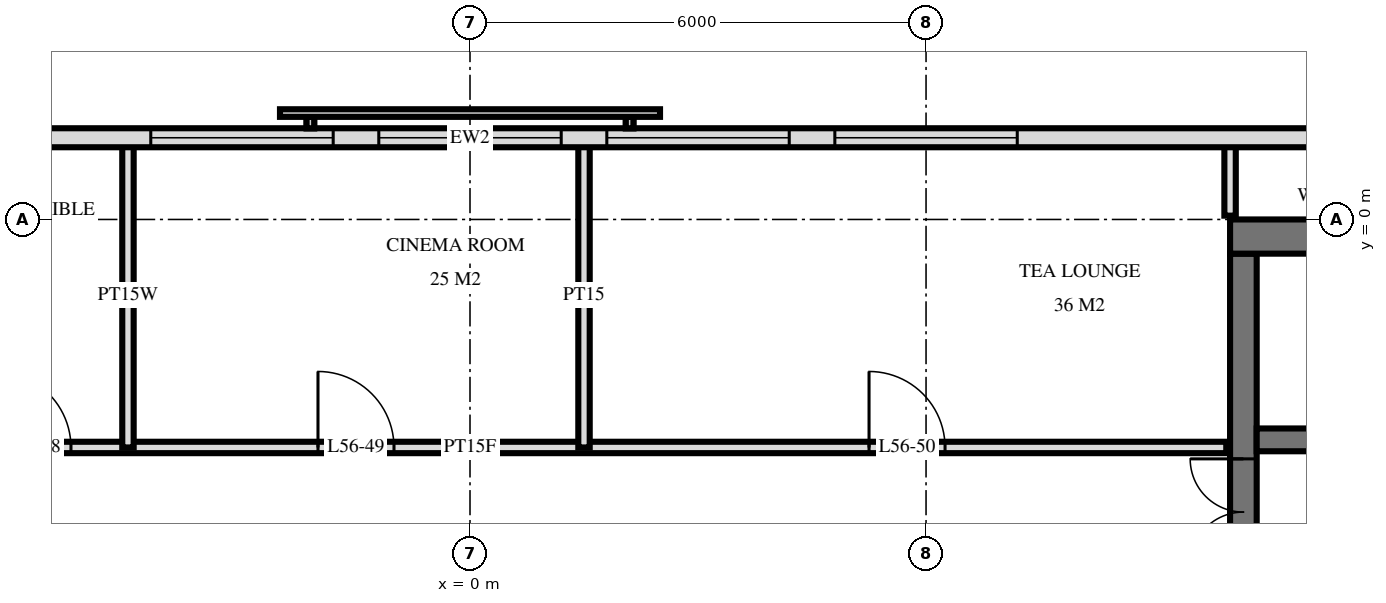
"""IFC4 building model, lengths in metres.
Left out: names, types, materials, properties, quantities, classifications, styles, units other than length and angle.
Written with IfcOpenShell. Run it as: python <this file> out.ifc"""

import sys

from ifc_helpers import new_model, si_unit, direction, frame, frame_2d, origin, place, context, subcontext, project, spatial, rectangle, extrude, element, fill, save


model = new_model("IFC4")
c1 = context("Model", 3, precision=1e-05, world=origin(), true_north=direction((0.0, 1.0)))
c2 = subcontext(c1, "Body", "Model", "MODEL_VIEW")
j1 = project(units=[si_unit("LENGTHUNIT", "METRE"), si_unit("PLANEANGLEUNIT", "RADIAN")], contexts=[c1])
p1 = place(None, origin())
s1 = spatial("IfcSite", under=j1, at=p1, CompositionType="ELEMENT")
p2 = place(p1, origin())
s2 = spatial("IfcBuilding", under=s1, at=p2, CompositionType="ELEMENT")
p3 = place(p2, frame((0.0, 0.0, 215.1)))
s3 = spatial("IfcBuildingStorey", under=s2, at=p3, CompositionType="ELEMENT", Elevation=215.1)
p4 = place(p3, frame((10.0, -0.225, 0.0), z_axis=(0.0, 0.0, 1.0), x_axis=(1.0, 0.0, 0.0)))
e1 = element("IfcWall", 1, at=p4, inside=s3, PredefinedType="SHEAR", context=c2, shape_type="SweptSolid", body=[
    extrude(rectangle(XDim=14.5, YDim=0.45, at=frame_2d((7.25, 0.0))), origin(), (0.0, 0.0, 1.0), 3.5),
])
p5 = place(p3, frame((10.175, -14.55, 0.0), z_axis=(0.0, 0.0, 1.0), x_axis=(0.0, 1.0, 0.0)))
e2 = element("IfcWall", 2, at=p5, inside=s3, PredefinedType="SHEAR", context=c2, shape_type="SweptSolid", body=[
    extrude(rectangle(XDim=14.1, YDim=0.35, at=frame_2d((7.05, 0.0))), origin(), (0.0, 0.0, 1.0), 3.5),
])
p6 = place(p5, frame((8.4, 0.0, 0.0)))
e3 = element("IfcOpeningElement", 3, at=p6, cuts=e2, PredefinedType="OPENING", context=c2, shape_type="SweptSolid", body=[
    extrude(rectangle(XDim=1.4, YDim=2.4, at=frame_2d((0.7, 1.2))), frame((0.0, 0.185, 0.0), z_axis=(0.0, -1.0, 0.0), x_axis=(1.0, 0.0, 0.0)), (0.0, 0.0, 1.0), 0.37),
])
p7 = place(p5, frame((10.0, 0.0, 0.0)))
e4 = element("IfcOpeningElement", 4, at=p7, cuts=e2, PredefinedType="OPENING", context=c2, shape_type="SweptSolid", body=[
    extrude(rectangle(XDim=1.4, YDim=2.4, at=frame_2d((0.7, 1.2))), frame((0.0, 0.185, 0.0), z_axis=(0.0, -1.0, 0.0), x_axis=(1.0, 0.0, 0.0)), (0.0, 0.0, 1.0), 0.37),
])
p8 = place(p5, frame((4.0, 0.0, 0.0)))
e5 = element("IfcOpeningElement", 5, at=p8, cuts=e2, PredefinedType="OPENING", context=c2, shape_type="SweptSolid", body=[
    extrude(rectangle(XDim=1.2, YDim=2.1, at=frame_2d((0.6, 1.05))), frame((0.0, 0.185, 0.0), z_axis=(0.0, -1.0, 0.0), x_axis=(1.0, 0.0, 0.0)), (0.0, 0.0, 1.0), 0.37),
])
p9 = place(p3, frame((10.35, -2.9, 0.0), z_axis=(0.0, 0.0, 1.0), x_axis=(1.0, 0.0, 0.0)))
e6 = element("IfcWall", 6, at=p9, inside=s3, PredefinedType="SHEAR", context=c2, shape_type="SweptSolid", body=[
    extrude(rectangle(XDim=13.7, YDim=0.3, at=frame_2d((6.85, 0.0))), origin(), (0.0, 0.0, 1.0), 3.5),
])
p10 = place(p9, frame((12.05, 0.0, 0.0)))
e7 = element("IfcOpeningElement", 7, at=p10, cuts=e6, PredefinedType="OPENING", context=c2, shape_type="SweptSolid", body=[
    extrude(rectangle(XDim=1.1, YDim=2.1, at=frame_2d((0.55, 1.05))), frame((0.0, 0.16, 0.0), z_axis=(0.0, -1.0, 0.0), x_axis=(1.0, 0.0, 0.0)), (0.0, 0.0, 1.0), 0.32),
])
p11 = place(p9, frame((5.938, 0.0, 0.0)))
e8 = element("IfcOpeningElement", 8, at=p11, cuts=e6, PredefinedType="OPENING", context=c2, shape_type="SweptSolid", body=[
    extrude(rectangle(XDim=0.9, YDim=2.1, at=frame_2d((0.45, 1.05))), frame((0.0, 0.16, 0.0), z_axis=(0.0, -1.0, 0.0), x_axis=(1.0, 0.0, 0.0)), (0.0, 0.0, 1.0), 0.32),
])
p12 = place(p9, frame((7.363, 0.0, 0.0)))
e9 = element("IfcOpeningElement", 9, at=p12, cuts=e6, PredefinedType="OPENING", context=c2, shape_type="SweptSolid", body=[
    extrude(rectangle(XDim=0.9, YDim=2.1, at=frame_2d((0.45, 1.05))), frame((0.0, 0.16, 0.0), z_axis=(0.0, -1.0, 0.0), x_axis=(1.0, 0.0, 0.0)), (0.0, 0.0, 1.0), 0.32),
])
p13 = place(p9, frame((0.85, 0.0, 0.0)))
e10 = element("IfcOpeningElement", 10, at=p13, cuts=e6, PredefinedType="OPENING", context=c2, shape_type="SweptSolid", body=[
    extrude(rectangle(XDim=1.0, YDim=2.1, at=frame_2d((0.5, 1.05))), frame((0.0, 0.16, 0.0), z_axis=(0.0, -1.0, 0.0), x_axis=(1.0, 0.0, 0.0)), (0.0, 0.0, 1.0), 0.32),
])
p14 = place(p9, frame((3.137, 0.0, 0.0)))
e11 = element("IfcOpeningElement", 11, at=p14, cuts=e6, PredefinedType="OPENING", context=c2, shape_type="SweptSolid", body=[
    extrude(rectangle(XDim=1.0, YDim=2.1, at=frame_2d((0.5, 1.05))), frame((0.0, 0.16, 0.0), z_axis=(0.0, -1.0, 0.0), x_axis=(1.0, 0.0, 0.0)), (0.0, 0.0, 1.0), 0.32),
])
p15 = place(p9, frame((4.562, 0.0, 0.0)))
e12 = element("IfcOpeningElement", 12, at=p15, cuts=e6, PredefinedType="OPENING", context=c2, shape_type="SweptSolid", body=[
    extrude(rectangle(XDim=1.0, YDim=2.1, at=frame_2d((0.5, 1.05))), frame((0.0, 0.16, 0.0), z_axis=(0.0, -1.0, 0.0), x_axis=(1.0, 0.0, 0.0)), (0.0, 0.0, 1.0), 0.32),
])
p16 = place(p9, frame((9.7, 0.0, 0.0)))
e13 = element("IfcOpeningElement", 13, at=p16, cuts=e6, PredefinedType="OPENING", context=c2, shape_type="SweptSolid", body=[
    extrude(rectangle(XDim=1.0, YDim=2.1, at=frame_2d((0.5, 1.05))), frame((0.0, 0.16, 0.0), z_axis=(0.0, -1.0, 0.0), x_axis=(1.0, 0.0, 0.0)), (0.0, 0.0, 1.0), 0.32),
])
p17 = place(p3, frame((22.475, 1.075, 0.0), z_axis=(0.0, 0.0, 1.0), x_axis=(-1.0, 0.0, 0.0)))
e14 = element("IfcWall", 14, at=p17, inside=s3, PredefinedType="SOLIDWALL", context=c2, shape_type="SweptSolid", body=[
    extrude(rectangle(XDim=44.951, YDim=0.25, at=frame_2d((22.475, 0.0))), origin(), (0.0, 0.0, 1.0), 3.22),
])
p18 = place(p17, frame((15.275, 0.0, 0.9)))
e15 = element("IfcOpeningElement", 15, at=p18, cuts=e14, PredefinedType="OPENING", context=c2, shape_type="SweptSolid", body=[
    extrude(rectangle(XDim=2.4, YDim=1.5, at=frame_2d((1.2, 0.75))), frame((0.0, 0.135, 0.0), z_axis=(0.0, -1.0, 0.0), x_axis=(1.0, 0.0, 0.0)), (0.0, 0.0, 1.0), 0.27),
])
p19 = place(p17, frame((18.275, 0.0, 0.9)))
e16 = element("IfcOpeningElement", 16, at=p19, cuts=e14, PredefinedType="OPENING", context=c2, shape_type="SweptSolid", body=[
    extrude(rectangle(XDim=2.4, YDim=1.5, at=frame_2d((1.2, 0.75))), frame((0.0, 0.135, 0.0), z_axis=(0.0, -1.0, 0.0), x_axis=(1.0, 0.0, 0.0)), (0.0, 0.0, 1.0), 0.27),
])
p20 = place(p17, frame((21.275, 0.0, 0.9)))
e17 = element("IfcOpeningElement", 17, at=p20, cuts=e14, PredefinedType="OPENING", context=c2, shape_type="SweptSolid", body=[
    extrude(rectangle(XDim=2.4, YDim=1.5, at=frame_2d((1.2, 0.75))), frame((0.0, 0.135, 0.0), z_axis=(0.0, -1.0, 0.0), x_axis=(1.0, 0.0, 0.0)), (0.0, 0.0, 1.0), 0.27),
])
p21 = place(p17, frame((24.275, 0.0, 0.9)))
e18 = element("IfcOpeningElement", 18, at=p21, cuts=e14, PredefinedType="OPENING", context=c2, shape_type="SweptSolid", body=[
    extrude(rectangle(XDim=2.4, YDim=1.5, at=frame_2d((1.2, 0.75))), frame((0.0, 0.135, 0.0), z_axis=(0.0, -1.0, 0.0), x_axis=(1.0, 0.0, 0.0)), (0.0, 0.0, 1.0), 0.27),
])
p22 = place(p3, frame((10.0, 0.05, 0.0), z_axis=(0.0, 0.0, 1.0), x_axis=(0.0, 1.0, 0.0)))
e19 = element("IfcWall", 19, at=p22, inside=s3, PredefinedType="PARTITIONING", context=c2, shape_type="SweptSolid", body=[
    extrude(rectangle(XDim=0.97, YDim=0.15, at=frame_2d((0.485, 0.0))), origin(), (0.0, 0.0, 1.0), 3.22),
])
p23 = place(p3, frame((1.5, -3.0, 0.0), z_axis=(0.0, 0.0, 1.0), x_axis=(0.0, 1.0, 0.0)))
e20 = element("IfcWall", 20, at=p23, inside=s3, PredefinedType="PARTITIONING", context=c2, shape_type="SweptSolid", body=[
    extrude(rectangle(XDim=4.02, YDim=0.15, at=frame_2d((2.01, 0.0))), origin(), (0.0, 0.0, 1.0), 3.22),
])
p24 = place(p3, frame((-4.5, -3.0, 0.0), z_axis=(0.0, 0.0, 1.0), x_axis=(0.0, 1.0, 0.0)))
e21 = element("IfcWall", 21, at=p24, inside=s3, PredefinedType="PLUMBINGWALL", context=c2, shape_type="SweptSolid", body=[
    extrude(rectangle(XDim=4.02, YDim=0.15, at=frame_2d((2.01, 0.0))), origin(), (0.0, 0.0, 1.0), 3.22),
])
p25 = place(p3, frame((-9.95, -3.0, 0.0), z_axis=(0.0, 0.0, 1.0), x_axis=(1.0, 0.0, 0.0)))
e22 = element("IfcWall", 22, at=p25, inside=s3, PredefinedType="PARTITIONING", context=c2, shape_type="SweptSolid", body=[
    extrude(rectangle(XDim=19.9, YDim=0.15, at=frame_2d((9.95, 0.0))), origin(), (0.0, 0.0, 1.0), 3.22),
])
p26 = place(p25, frame((0.95, 0.0, 0.0)))
e23 = element("IfcOpeningElement", 23, at=p26, cuts=e22, PredefinedType="OPENING", context=c2, shape_type="SweptSolid", body=[
    extrude(rectangle(XDim=1.0, YDim=2.1, at=frame_2d((0.5, 1.05))), frame((0.0, 0.085, 0.0), z_axis=(0.0, -1.0, 0.0), x_axis=(1.0, 0.0, 0.0)), (0.0, 0.0, 1.0), 0.17),
])
p27 = place(p25, frame((3.7, 0.0, 0.0)))
e24 = element("IfcOpeningElement", 24, at=p27, cuts=e22, PredefinedType="OPENING", context=c2, shape_type="SweptSolid", body=[
    extrude(rectangle(XDim=1.0, YDim=2.1, at=frame_2d((0.5, 1.05))), frame((0.0, 0.085, 0.0), z_axis=(0.0, -1.0, 0.0), x_axis=(1.0, 0.0, 0.0)), (0.0, 0.0, 1.0), 0.17),
])
p28 = place(p25, frame((7.95, 0.0, 0.0)))
e25 = element("IfcOpeningElement", 25, at=p28, cuts=e22, PredefinedType="OPENING", context=c2, shape_type="SweptSolid", body=[
    extrude(rectangle(XDim=1.0, YDim=2.1, at=frame_2d((0.5, 1.05))), frame((0.0, 0.085, 0.0), z_axis=(0.0, -1.0, 0.0), x_axis=(1.0, 0.0, 0.0)), (0.0, 0.0, 1.0), 0.17),
])
p29 = place(p25, frame((15.2, 0.0, 0.0)))
e26 = element("IfcOpeningElement", 26, at=p29, cuts=e22, PredefinedType="OPENING", context=c2, shape_type="SweptSolid", body=[
    extrude(rectangle(XDim=1.0, YDim=2.1, at=frame_2d((0.5, 1.05))), frame((0.0, 0.085, 0.0), z_axis=(0.0, -1.0, 0.0), x_axis=(1.0, 0.0, 0.0)), (0.0, 0.0, 1.0), 0.17),
])
p30 = place(p18, origin())
e27 = element("IfcWindow", 27, at=p30, inside=s3, PartitioningType="SINGLE_PANEL", PredefinedType="WINDOW", context=c2, shape_type="SweptSolid", body=[
    extrude(rectangle(XDim=2.4, YDim=1.5, at=frame_2d((1.2, 0.75))), frame((0.0, 0.03, 0.0), z_axis=(0.0, -1.0, 0.0), x_axis=(1.0, 0.0, 0.0)), (0.0, 0.0, 1.0), 0.06),
])
fill(e15, e27)
p31 = place(p19, origin())
e28 = element("IfcWindow", 28, at=p31, inside=s3, PartitioningType="SINGLE_PANEL", PredefinedType="WINDOW", context=c2, shape_type="SweptSolid", body=[
    extrude(rectangle(XDim=2.4, YDim=1.5, at=frame_2d((1.2, 0.75))), frame((0.0, 0.03, 0.0), z_axis=(0.0, -1.0, 0.0), x_axis=(1.0, 0.0, 0.0)), (0.0, 0.0, 1.0), 0.06),
])
fill(e16, e28)
p32 = place(p20, origin())
e29 = element("IfcWindow", 29, at=p32, inside=s3, PartitioningType="SINGLE_PANEL", PredefinedType="WINDOW", context=c2, shape_type="SweptSolid", body=[
    extrude(rectangle(XDim=2.4, YDim=1.5, at=frame_2d((1.2, 0.75))), frame((0.0, 0.03, 0.0), z_axis=(0.0, -1.0, 0.0), x_axis=(1.0, 0.0, 0.0)), (0.0, 0.0, 1.0), 0.06),
])
fill(e17, e29)
p33 = place(p21, origin())
e30 = element("IfcWindow", 30, at=p33, inside=s3, PartitioningType="SINGLE_PANEL", PredefinedType="WINDOW", context=c2, shape_type="SweptSolid", body=[
    extrude(rectangle(XDim=2.4, YDim=1.5, at=frame_2d((1.2, 0.75))), frame((0.0, 0.03, 0.0), z_axis=(0.0, -1.0, 0.0), x_axis=(1.0, 0.0, 0.0)), (0.0, 0.0, 1.0), 0.06),
])
fill(e18, e30)
p34 = place(p7, origin())
e31 = element("IfcDoor", 31, at=p34, inside=s3, OperationType="DOUBLE_DOOR_SINGLE_SWING", PredefinedType="DOOR", context=c2, shape_type="SweptSolid", body=[
    extrude(rectangle(XDim=1.4, YDim=2.4, at=frame_2d((0.7, 1.2))), frame((0.0, 0.025, 0.0), z_axis=(0.0, -1.0, 0.0), x_axis=(1.0, 0.0, 0.0)), (0.0, 0.0, 1.0), 0.05),
])
fill(e4, e31)
p35 = place(p27, origin())
e32 = element("IfcDoor", 32, at=p35, inside=s3, OperationType="SINGLE_SWING_RIGHT", PredefinedType="DOOR", context=c2, shape_type="SweptSolid", body=[
    extrude(rectangle(XDim=1.0, YDim=2.1, at=frame_2d((0.5, 1.05))), frame((0.0, 0.025, 0.0), z_axis=(0.0, -1.0, 0.0), x_axis=(1.0, 0.0, 0.0)), (0.0, 0.0, 1.0), 0.05),
])
fill(e24, e32)
p36 = place(p28, origin())
e33 = element("IfcDoor", 33, at=p36, inside=s3, OperationType="SINGLE_SWING_RIGHT", PredefinedType="DOOR", context=c2, shape_type="SweptSolid", body=[
    extrude(rectangle(XDim=1.0, YDim=2.1, at=frame_2d((0.5, 1.05))), frame((0.0, 0.025, 0.0), z_axis=(0.0, -1.0, 0.0), x_axis=(1.0, 0.0, 0.0)), (0.0, 0.0, 1.0), 0.05),
])
fill(e25, e33)
p37 = place(p29, origin())
e34 = element("IfcDoor", 34, at=p37, inside=s3, OperationType="SINGLE_SWING_RIGHT", PredefinedType="DOOR", context=c2, shape_type="SweptSolid", body=[
    extrude(rectangle(XDim=1.0, YDim=2.1, at=frame_2d((0.5, 1.05))), frame((0.0, 0.025, 0.0), z_axis=(0.0, -1.0, 0.0), x_axis=(1.0, 0.0, 0.0)), (0.0, 0.0, 1.0), 0.05),
])
fill(e26, e34)
save(model, sys.argv[1])
